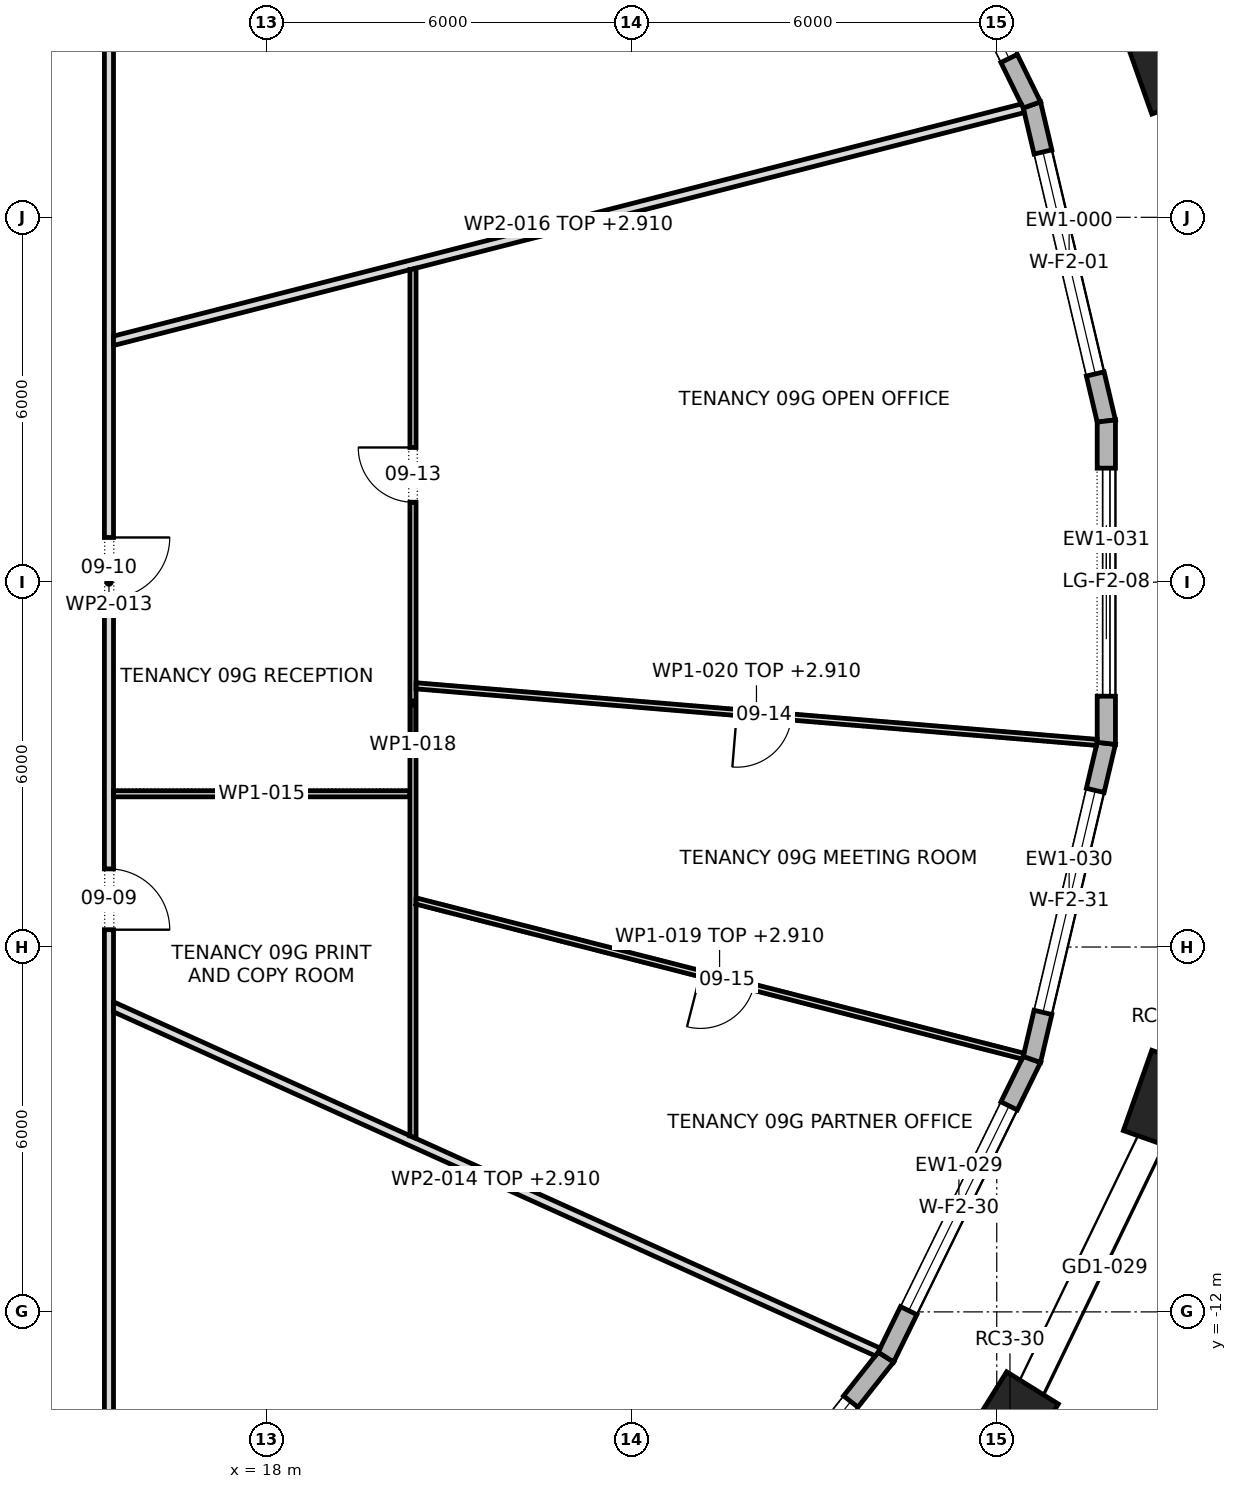
"""IFC4 building model, lengths in metres.
Left out: names, types, materials, properties, quantities, classifications, styles, units other than length and angle.
Written with IfcOpenShell. Run it as: python <this file> out.ifc"""

import sys

from ifc_helpers import new_model, si_unit, direction, frame, frame_2d, origin, origin_2d, place, context, subcontext, project, spatial, polyline, rectangle, outline, extrude, element, fill, save


model = new_model("IFC4")
c1 = context("Model", 3, precision=1e-05, world=origin(), true_north=direction((0.0, 1.0)))
c2 = subcontext(c1, "Body", "Model", "MODEL_VIEW")
j1 = project(units=[si_unit("LENGTHUNIT", "METRE"), si_unit("PLANEANGLEUNIT", "RADIAN")], contexts=[c1])
p1 = place(None, origin())
s1 = spatial("IfcSite", under=j1, at=p1, CompositionType="ELEMENT")
p2 = place(p1, origin())
s2 = spatial("IfcBuilding", under=s1, at=p2, CompositionType="ELEMENT")
p3 = place(p2, frame((0.0, 0.0, 138.1)))
s3 = spatial("IfcBuildingStorey", under=s2, at=p3, CompositionType="ELEMENT", Elevation=138.1)
for number, where, z_axis, x_axis in (
    (1, (32.788, 8.525, 0.0), (0.0, 0.0, 1.0), (-0.334, 0.943, 0.0)),
    (2, (30.217, -13.844, 0.0), (0.0, 0.0, 1.0), (0.529, 0.849, 0.0)),
    (3, (32.788, -8.525, 0.0), (0.0, 0.0, 1.0), (0.334, 0.943, 0.0)),
):
    element("IfcColumn", number, at=place(p3, frame(where, z_axis=z_axis, x_axis=x_axis)), inside=s3, PredefinedType="COLUMN", context=c2, shape_type="SweptSolid", body=[
        extrude(rectangle(XDim=1.4, YDim=1.0, at=origin_2d()), origin(), (0.0, 0.0, 1.0), 4.2),
    ])
p4 = place(p3, frame((31.802, 2.65, 0.0), z_axis=(0.0, 0.0, 1.0), x_axis=(-0.229227895667, 0.973372781543, 0.0)))
e4 = element("IfcWall", 4, at=p4, inside=s3, PredefinedType="STANDARD", context=c2, shape_type="SweptSolid", body=[
    extrude(outline(polyline([(-0.017, -0.15), (5.357, -0.15), (5.323, 0.15), (0.017, 0.15), (-0.017, -0.15)])), origin(), (0.0, 0.0, 1.0), 3.9),
])
p5 = place(p4, frame((0.795, 0.0, 0.6)))
e5 = element("IfcOpeningElement", 5, at=p5, cuts=e4, PredefinedType="OPENING", context=c2, shape_type="SweptSolid", body=[
    extrude(rectangle(XDim=3.75, YDim=2.85, at=frame_2d((1.875, 1.425))), frame((0.0, 0.162, 0.0), z_axis=(0.0, -1.0, 0.0), x_axis=(1.0, 0.0, 0.0)), (0.0, 0.0, 1.0), 0.324),
])
p6 = place(p3, frame((30.578, 7.848, 0.0), z_axis=(0.0, 0.0, 1.0), x_axis=(-0.440321465864, 0.897840189956, 0.0)))
e6 = element("IfcWall", 6, at=p6, inside=s3, PredefinedType="STANDARD", context=c2, shape_type="SweptSolid", body=[
    extrude(outline(polyline([(-0.017, -0.15), (5.468, -0.15), (5.435, 0.15), (0.017, 0.15), (-0.017, -0.15)])), origin(), (0.0, 0.0, 1.0), 3.9),
])
p7 = place(p6, frame((0.851, 0.0, 0.6)))
e7 = element("IfcOpeningElement", 7, at=p7, cuts=e6, PredefinedType="OPENING", context=c2, shape_type="SweptSolid", body=[
    extrude(rectangle(XDim=3.75, YDim=2.85, at=frame_2d((1.875, 1.425))), frame((0.0, 0.162, 0.0), z_axis=(0.0, -1.0, 0.0), x_axis=(1.0, 0.0, 0.0)), (0.0, 0.0, 1.0), 0.324),
])
p8 = place(p3, frame((24.694, -17.146, 0.0), z_axis=(0.0, 0.0, 1.0), x_axis=(0.620464552431, 0.784234492468, 0.0)))
e8 = element("IfcWall", 8, at=p8, inside=s3, PredefinedType="STANDARD", context=c2, shape_type="SweptSolid", body=[
    extrude(outline(polyline([(-0.015, -0.15), (5.63, -0.15), (5.598, 0.15), (0.015, 0.15), (-0.015, -0.15)])), origin(), (0.0, 0.0, 1.0), 3.9),
])
p9 = place(p8, frame((0.932, 0.0, 0.6)))
e9 = element("IfcOpeningElement", 9, at=p9, cuts=e8, PredefinedType="OPENING", context=c2, shape_type="SweptSolid", body=[
    extrude(rectangle(XDim=3.75, YDim=2.85, at=frame_2d((1.875, 1.425))), frame((0.0, 0.162, 0.0), z_axis=(0.0, -1.0, 0.0), x_axis=(1.0, 0.0, 0.0)), (0.0, 0.0, 1.0), 0.324),
])
p10 = place(p3, frame((28.177, -12.743, 0.0), z_axis=(0.0, 0.0, 1.0), x_axis=(0.440321465864, 0.897840189956, 0.0)))
e10 = element("IfcWall", 10, at=p10, inside=s3, PredefinedType="STANDARD", context=c2, shape_type="SweptSolid", body=[
    extrude(outline(polyline([(-0.016, -0.15), (5.468, -0.15), (5.435, 0.15), (0.016, 0.15), (-0.016, -0.15)])), origin(), (0.0, 0.0, 1.0), 3.9),
])
p11 = place(p10, frame((0.851, 0.0, 0.6)))
e11 = element("IfcOpeningElement", 11, at=p11, cuts=e10, PredefinedType="OPENING", context=c2, shape_type="SweptSolid", body=[
    extrude(rectangle(XDim=3.75, YDim=2.85, at=frame_2d((1.875, 1.425))), frame((0.0, 0.162, 0.0), z_axis=(0.0, -1.0, 0.0), x_axis=(1.0, 0.0, 0.0)), (0.0, 0.0, 1.0), 0.324),
])
p12 = place(p3, frame((30.578, -7.848, 0.0), z_axis=(0.0, 0.0, 1.0), x_axis=(0.229227895667, 0.973372781543, 0.0)))
e12 = element("IfcWall", 12, at=p12, inside=s3, PredefinedType="STANDARD", context=c2, shape_type="SweptSolid", body=[
    extrude(outline(polyline([(-0.017, -0.15), (5.357, -0.15), (5.323, 0.15), (0.017, 0.15), (-0.017, -0.15)])), origin(), (0.0, 0.0, 1.0), 3.9),
])
p13 = place(p12, frame((0.795, 0.0, 0.6)))
e13 = element("IfcOpeningElement", 13, at=p13, cuts=e12, PredefinedType="OPENING", context=c2, shape_type="SweptSolid", body=[
    extrude(rectangle(XDim=3.75, YDim=2.85, at=frame_2d((1.875, 1.425))), frame((0.0, 0.162, 0.0), z_axis=(0.0, -1.0, 0.0), x_axis=(1.0, 0.0, 0.0)), (0.0, 0.0, 1.0), 0.324),
])
p14 = place(p3, frame((31.802, -2.65, 0.0), z_axis=(0.0, 0.0, 1.0), x_axis=(0.0, 1.0, 0.0)))
e14 = element("IfcWall", 14, at=p14, inside=s3, PredefinedType="STANDARD", context=c2, shape_type="SweptSolid", body=[
    extrude(outline(polyline([(-0.017, -0.15), (5.318, -0.15), (5.283, 0.15), (0.017, 0.15), (-0.017, -0.15)])), origin(), (0.0, 0.0, 1.0), 3.9),
])
p15 = place(p14, frame((0.775, 0.0, 0.0)))
e15 = element("IfcOpeningElement", 15, at=p15, cuts=e14, PredefinedType="OPENING", context=c2, shape_type="SweptSolid", body=[
    extrude(rectangle(XDim=3.75, YDim=3.45, at=frame_2d((1.875, 1.725))), frame((0.0, 0.162, 0.0), z_axis=(0.0, -1.0, 0.0), x_axis=(1.0, 0.0, 0.0)), (0.0, 0.0, 1.0), 0.324),
])
p16 = place(p3, frame((15.4, -15.475, 0.0), z_axis=(0.0, 0.0, 1.0), x_axis=(0.0, 1.0, 0.0)))
e16 = element("IfcWall", 16, at=p16, inside=s3, PredefinedType="PARTITIONING", context=c2, shape_type="SweptSolid", body=[
    extrude(outline(polyline([(0.0, -0.075), (1.935, -0.075), (3.869, -0.075), (5.803, -0.075), (7.738, -0.075), (9.672, -0.075), (11.606, -0.075), (13.541, -0.075), (15.475, -0.075), (17.409, -0.075), (19.344, -0.075), (21.278, -0.075), (23.212, -0.075), (25.147, -0.075), (27.081, -0.075), (29.016, -0.075), (30.95, -0.075), (30.8, 0.075), (28.885, 0.075), (26.969, 0.075), (25.053, 0.075), (23.138, 0.075), (21.222, 0.075), (19.306, 0.075), (17.391, 0.075), (15.475, 0.075), (13.56, 0.075), (11.644, 0.075), (9.728, 0.075), (7.812, 0.075), (5.897, 0.075), (3.981, 0.075), (2.066, 0.075), (0.15, 0.075), (0.0, -0.075)])), origin(), (0.0, 0.0, 1.0), 3.9),
])
p17 = place(p16, frame((9.76, 0.0, 0.0)))
e17 = element("IfcOpeningElement", 17, at=p17, cuts=e16, PredefinedType="OPENING", context=c2, shape_type="SweptSolid", body=[
    extrude(rectangle(XDim=1.0, YDim=2.1, at=frame_2d((0.5, 1.05))), frame((0.0, 0.087, 0.0), z_axis=(0.0, -1.0, 0.0), x_axis=(1.0, 0.0, 0.0)), (0.0, 0.0, 1.0), 0.174),
])
p18 = place(p16, frame((15.21, 0.0, 0.0)))
e18 = element("IfcOpeningElement", 18, at=p18, cuts=e16, PredefinedType="OPENING", context=c2, shape_type="SweptSolid", body=[
    extrude(rectangle(XDim=1.0, YDim=2.1, at=frame_2d((0.5, 1.05))), frame((0.0, 0.087, 0.0), z_axis=(0.0, -1.0, 0.0), x_axis=(1.0, 0.0, 0.0)), (0.0, 0.0, 1.0), 0.174),
])
p19 = place(p16, frame((24.25, 0.0, 0.0)))
e19 = element("IfcOpeningElement", 19, at=p19, cuts=e16, PredefinedType="OPENING", context=c2, shape_type="SweptSolid", body=[
    extrude(rectangle(XDim=1.8, YDim=2.1, at=frame_2d((0.9, 1.05))), frame((0.0, 0.087, 0.0), z_axis=(0.0, -1.0, 0.0), x_axis=(1.0, 0.0, 0.0)), (0.0, 0.0, 1.0), 0.174),
])
p20 = place(p3, frame((15.444, -6.97, 0.0), z_axis=(0.0, 0.0, 1.0), x_axis=(0.911352660786, -0.411626441909, 0.0)))
e20 = element("IfcWall", 20, at=p20, inside=s3, PredefinedType="PARTITIONING", context=c2, shape_type="SweptSolid", body=[
    extrude(outline(polyline([(0.068, -0.075), (2.031, -0.075), (3.995, -0.075), (5.958, -0.075), (7.922, -0.075), (9.885, -0.075), (11.849, -0.075), (13.812, -0.075), (13.832, 0.001), (13.834, 0.074), (13.834, 0.075), (12.137, 0.075), (10.441, 0.075), (8.745, 0.075), (7.049, 0.075), (5.353, 0.075), (5.35, 0.074), (5.349, 0.075), (3.566, 0.075), (1.783, 0.075), (0.0, 0.075), (0.068, -0.075)])), origin(), (0.0, 0.0, 1.0), 2.91),
])
p21 = place(p3, frame((15.475, -3.48, 0.0), z_axis=(0.0, 0.0, 1.0), x_axis=(1.0, 0.0, 0.0)))
e21 = element("IfcWall", 21, at=p21, inside=s3, PredefinedType="PARTITIONING", context=c2, shape_type="SweptSolid", body=[
    extrude(rectangle(XDim=4.875, YDim=0.1, at=frame_2d((2.438, 0.0))), origin(), (0.0, 0.0, 1.0), 3.9),
])
p22 = place(p3, frame((15.457, 3.965, 0.0), z_axis=(0.0, 0.0, 1.0), x_axis=(0.968826155352, 0.247741560312, 0.0)))
e22 = element("IfcWall", 22, at=p22, inside=s3, PredefinedType="PARTITIONING", context=c2, shape_type="SweptSolid", body=[
    extrude(outline(polyline([(0.0, -0.075), (1.677, -0.075), (3.354, -0.075), (5.031, -0.075), (5.032, -0.073), (5.038, -0.075), (6.775, -0.075), (8.512, -0.075), (10.249, -0.075), (11.986, -0.075), (13.723, -0.075), (15.46, -0.075), (15.46, 0.01), (15.447, 0.075), (13.521, 0.075), (11.594, 0.075), (9.668, 0.075), (7.742, 0.075), (5.816, 0.075), (3.89, 0.075), (1.964, 0.075), (0.038, 0.075), (0.0, -0.073), (0.0, -0.075)])), origin(), (0.0, 0.0, 1.0), 2.91),
])
p23 = place(p3, frame((20.4, -9.148, 0.0), z_axis=(0.0, 0.0, 1.0), x_axis=(0.0, 1.0, 0.0)))
e23 = element("IfcWall", 23, at=p23, inside=s3, PredefinedType="PARTITIONING", context=c2, shape_type="SweptSolid", body=[
    extrude(outline(polyline([(0.0, -0.05), (1.927, -0.05), (3.854, -0.05), (3.854, -0.048), (3.861, -0.05), (5.603, -0.05), (7.345, -0.05), (9.087, -0.05), (10.828, -0.05), (12.57, -0.05), (14.312, -0.05), (14.312, -0.049), (14.287, 0.05), (12.573, 0.05), (10.859, 0.05), (9.146, 0.05), (7.432, 0.05), (5.719, 0.05), (5.719, 0.05), (5.618, 0.05), (5.618, 0.05), (3.761, 0.05), (1.903, 0.05), (0.045, 0.05), (0.0, -0.05), (0.0, -0.05)])), origin(), (0.0, 0.0, 1.0), 3.9),
])
p24 = place(p23, frame((10.463, 0.0, 0.0)))
e24 = element("IfcOpeningElement", 24, at=p24, cuts=e23, PredefinedType="OPENING", context=c2, shape_type="SweptSolid", body=[
    extrude(rectangle(XDim=0.9, YDim=2.1, at=frame_2d((0.45, 1.05))), frame((0.0, 0.062, 0.0), z_axis=(0.0, -1.0, 0.0), x_axis=(1.0, 0.0, 0.0)), (0.0, 0.0, 1.0), 0.124),
])
p25 = place(p3, frame((20.438, -5.24, 0.0), z_axis=(0.0, 0.0, 1.0), x_axis=(0.968862785912, -0.247598267511, 0.0)))
e25 = element("IfcWall", 25, at=p25, inside=s3, PredefinedType="PARTITIONING", context=c2, shape_type="SweptSolid", body=[
    extrude(outline(polyline([(0.025, -0.05), (1.74, -0.05), (3.454, -0.05), (5.168, -0.05), (6.882, -0.05), (8.596, -0.05), (10.31, -0.05), (10.319, -0.008), (10.319, 0.05), (8.599, 0.05), (6.879, 0.05), (5.159, 0.05), (3.44, 0.05), (1.72, 0.05), (0.0, 0.05), (0.0, 0.05), (0.025, -0.05)])), origin(), (0.0, 0.0, 1.0), 2.91),
])
p26 = place(p25, frame((4.842, 0.0, 0.0)))
e26 = element("IfcOpeningElement", 26, at=p26, cuts=e25, PredefinedType="OPENING", context=c2, shape_type="SweptSolid", body=[
    extrude(rectangle(XDim=0.9, YDim=2.1, at=frame_2d((0.45, 1.05))), frame((0.0, 0.062, 0.0), z_axis=(0.0, -1.0, 0.0), x_axis=(1.0, 0.0, 0.0)), (0.0, 0.0, 1.0), 0.124),
])
p27 = place(p3, frame((20.446, -1.704, 0.0), z_axis=(0.0, 0.0, 1.0), x_axis=(0.996562664629, -0.082842353107, 0.0)))
e27 = element("IfcWall", 27, at=p27, inside=s3, PredefinedType="PARTITIONING", context=c2, shape_type="SweptSolid", body=[
    extrude(outline(polyline([(0.008, -0.05), (1.879, -0.05), (3.751, -0.05), (5.622, -0.05), (7.494, -0.05), (9.365, -0.05), (11.236, -0.05), (11.24, -0.026), (11.24, 0.05), (9.367, 0.05), (7.493, 0.05), (5.62, 0.05), (3.747, 0.05), (1.873, 0.05), (0.0, 0.05), (0.0, 0.045), (0.008, -0.05)])), origin(), (0.0, 0.0, 1.0), 2.91),
])
p28 = place(p27, frame((5.298, 0.0, 0.0)))
e28 = element("IfcOpeningElement", 28, at=p28, cuts=e27, PredefinedType="OPENING", context=c2, shape_type="SweptSolid", body=[
    extrude(rectangle(XDim=0.9, YDim=2.1, at=frame_2d((0.45, 1.05))), frame((0.0, 0.062, 0.0), z_axis=(0.0, -1.0, 0.0), x_axis=(1.0, 0.0, 0.0)), (0.0, 0.0, 1.0), 0.124),
])
p29 = place(p5, origin())
e29 = element("IfcWindow", 29, at=p29, inside=s3, PartitioningType="TRIPLE_PANEL_VERTICAL", PredefinedType="WINDOW", context=c2, shape_type="SweptSolid", body=[
    extrude(rectangle(XDim=3.75, YDim=2.85, at=frame_2d((1.875, 1.425))), frame((0.0, 0.03, 0.0), z_axis=(0.0, -1.0, 0.0), x_axis=(1.0, 0.0, 0.0)), (0.0, 0.0, 1.0), 0.06),
])
fill(e5, e29)
p30 = place(p7, origin())
e30 = element("IfcWindow", 30, at=p30, inside=s3, PartitioningType="TRIPLE_PANEL_VERTICAL", PredefinedType="WINDOW", context=c2, shape_type="SweptSolid", body=[
    extrude(rectangle(XDim=3.75, YDim=2.85, at=frame_2d((1.875, 1.425))), frame((0.0, 0.03, 0.0), z_axis=(0.0, -1.0, 0.0), x_axis=(1.0, 0.0, 0.0)), (0.0, 0.0, 1.0), 0.06),
])
fill(e7, e30)
p31 = place(p9, origin())
e31 = element("IfcWindow", 31, at=p31, inside=s3, PartitioningType="TRIPLE_PANEL_VERTICAL", PredefinedType="WINDOW", context=c2, shape_type="SweptSolid", body=[
    extrude(rectangle(XDim=3.75, YDim=2.85, at=frame_2d((1.875, 1.425))), frame((0.0, 0.03, 0.0), z_axis=(0.0, -1.0, 0.0), x_axis=(1.0, 0.0, 0.0)), (0.0, 0.0, 1.0), 0.06),
])
fill(e9, e31)
p32 = place(p11, origin())
e32 = element("IfcWindow", 32, at=p32, inside=s3, PartitioningType="TRIPLE_PANEL_VERTICAL", PredefinedType="WINDOW", context=c2, shape_type="SweptSolid", body=[
    extrude(rectangle(XDim=3.75, YDim=2.85, at=frame_2d((1.875, 1.425))), frame((0.0, 0.03, 0.0), z_axis=(0.0, -1.0, 0.0), x_axis=(1.0, 0.0, 0.0)), (0.0, 0.0, 1.0), 0.06),
])
fill(e11, e32)
p33 = place(p13, origin())
e33 = element("IfcWindow", 33, at=p33, inside=s3, PartitioningType="TRIPLE_PANEL_VERTICAL", PredefinedType="WINDOW", context=c2, shape_type="SweptSolid", body=[
    extrude(rectangle(XDim=3.75, YDim=2.85, at=frame_2d((1.875, 1.425))), frame((0.0, 0.03, 0.0), z_axis=(0.0, -1.0, 0.0), x_axis=(1.0, 0.0, 0.0)), (0.0, 0.0, 1.0), 0.06),
])
fill(e13, e33)
p34 = place(p15, origin())
e34 = element("IfcDoor", 34, at=p34, inside=s3, OperationType="DOUBLE_DOOR_SLIDING", PredefinedType="DOOR", context=c2, shape_type="SweptSolid", body=[
    extrude(rectangle(XDim=3.75, YDim=3.45, at=frame_2d((1.875, 1.725))), frame((0.0, 0.025, 0.0), z_axis=(0.0, -1.0, 0.0), x_axis=(1.0, 0.0, 0.0)), (0.0, 0.0, 1.0), 0.05),
])
fill(e15, e34)
p35 = place(p17, frame((1.0, 0.0, 0.0), z_axis=(0.0, 0.0, 1.0), x_axis=(-1.0, 0.0, 0.0)))
e35 = element("IfcDoor", 35, at=p35, inside=s3, OperationType="SINGLE_SWING_LEFT", PredefinedType="DOOR", context=c2, shape_type="SweptSolid", body=[
    extrude(rectangle(XDim=1.0, YDim=2.1, at=frame_2d((0.5, 1.05))), frame((0.0, 0.025, 0.0), z_axis=(0.0, -1.0, 0.0), x_axis=(1.0, 0.0, 0.0)), (0.0, 0.0, 1.0), 0.05),
])
fill(e17, e35)
p36 = place(p18, frame((1.0, 0.0, 0.0), z_axis=(0.0, 0.0, 1.0), x_axis=(-1.0, 0.0, 0.0)))
e36 = element("IfcDoor", 36, at=p36, inside=s3, OperationType="SINGLE_SWING_RIGHT", PredefinedType="DOOR", context=c2, shape_type="SweptSolid", body=[
    extrude(rectangle(XDim=1.0, YDim=2.1, at=frame_2d((0.5, 1.05))), frame((0.0, 0.025, 0.0), z_axis=(0.0, -1.0, 0.0), x_axis=(1.0, 0.0, 0.0)), (0.0, 0.0, 1.0), 0.05),
])
fill(e18, e36)
p37 = place(p24, origin())
e37 = element("IfcDoor", 37, at=p37, inside=s3, OperationType="SINGLE_SWING_LEFT", PredefinedType="DOOR", context=c2, shape_type="SweptSolid", body=[
    extrude(rectangle(XDim=0.9, YDim=2.1, at=frame_2d((0.45, 1.05))), frame((0.0, 0.025, 0.0), z_axis=(0.0, -1.0, 0.0), x_axis=(1.0, 0.0, 0.0)), (0.0, 0.0, 1.0), 0.05),
])
fill(e24, e37)
p38 = place(p28, frame((0.9, 0.0, 0.0), z_axis=(0.0, 0.0, 1.0), x_axis=(-1.0, 0.0, 0.0)))
e38 = element("IfcDoor", 38, at=p38, inside=s3, OperationType="SINGLE_SWING_LEFT", PredefinedType="DOOR", context=c2, shape_type="SweptSolid", body=[
    extrude(rectangle(XDim=0.9, YDim=2.1, at=frame_2d((0.45, 1.05))), frame((0.0, 0.025, 0.0), z_axis=(0.0, -1.0, 0.0), x_axis=(1.0, 0.0, 0.0)), (0.0, 0.0, 1.0), 0.05),
])
fill(e28, e38)
p39 = place(p26, frame((0.9, 0.0, 0.0), z_axis=(0.0, 0.0, 1.0), x_axis=(-1.0, 0.0, 0.0)))
e39 = element("IfcDoor", 39, at=p39, inside=s3, OperationType="SINGLE_SWING_LEFT", PredefinedType="DOOR", context=c2, shape_type="SweptSolid", body=[
    extrude(rectangle(XDim=0.9, YDim=2.1, at=frame_2d((0.45, 1.05))), frame((0.0, 0.025, 0.0), z_axis=(0.0, -1.0, 0.0), x_axis=(1.0, 0.0, 0.0)), (0.0, 0.0, 1.0), 0.05),
])
fill(e26, e39)
save(model, sys.argv[1])
